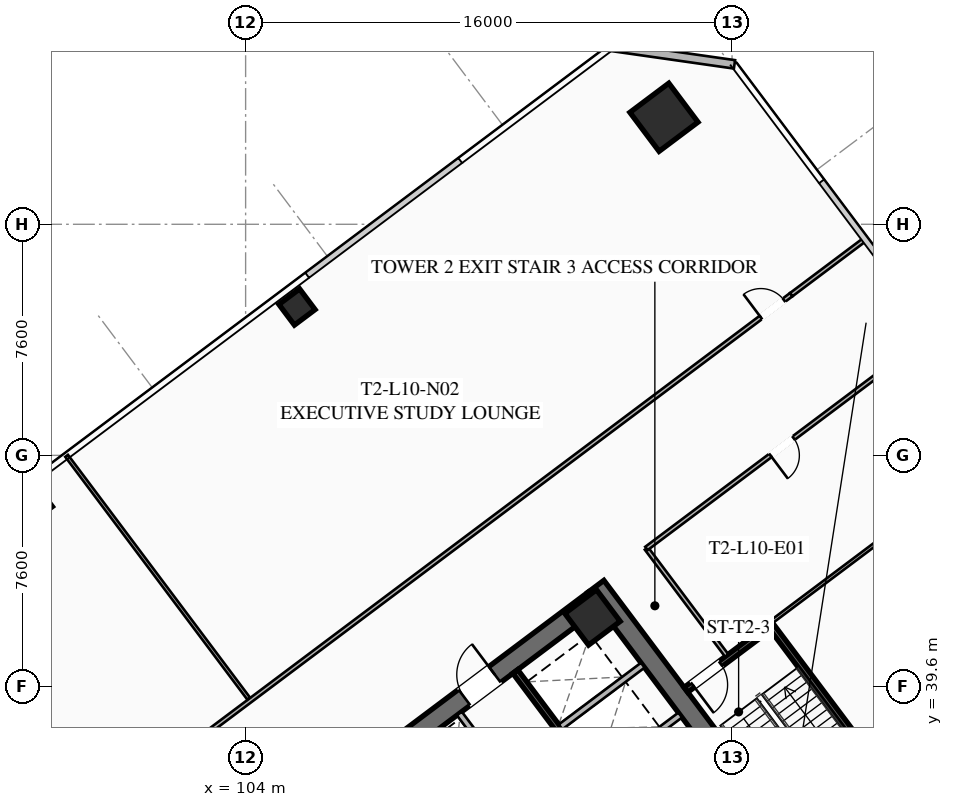
"""IFC4 building model, lengths in metres.
Left out: names, types, materials, properties, quantities, classifications, styles, units other than length and angle.
Written with IfcOpenShell. Run it as: python <this file> out.ifc"""

import sys

from ifc_helpers import new_model, si_unit, direction, frame, frame_2d, origin, origin_2d, place, context, subcontext, project, spatial, rectangle, hollow_rectangle, extrude, element, fill, save


model = new_model("IFC4")
c1 = context("Model", 3, precision=1e-05, world=origin(), true_north=direction((0.0, 1.0)))
c2 = subcontext(c1, "Body", "Model", "MODEL_VIEW")
j1 = project(units=[si_unit("LENGTHUNIT", "METRE"), si_unit("PLANEANGLEUNIT", "RADIAN")], contexts=[c1])
p1 = place(None, origin())
s1 = spatial("IfcSite", under=j1, at=p1, CompositionType="ELEMENT")
p2 = place(p1, origin())
s2 = spatial("IfcBuilding", under=s1, at=p2, CompositionType="ELEMENT")
p3 = place(p2, frame((0.0, 0.0, 42.35)))
s3 = spatial("IfcBuildingStorey", under=s2, at=p3, CompositionType="ELEMENT", Elevation=42.35)
p4 = place(p3, frame((115.524, 42.893, 0.0), z_axis=(0.0, 0.0, 1.0), x_axis=(0.600005007985, -0.799996243986, 0.0)))
e1 = element("IfcWall", 1, at=p4, inside=s3, PredefinedType="SHEAR", context=c2, shape_type="SweptSolid", body=[
    extrude(rectangle(XDim=15.6, YDim=0.65, at=frame_2d((7.8, 0.0))), origin(), (0.0, 0.0, 1.0), 3.55),
])
p5 = place(p3, frame((103.571, 33.522, 0.0), z_axis=(0.0, 0.0, 1.0), x_axis=(0.799998028465, 0.600002628705, 0.0)))
e2 = element("IfcWall", 2, at=p5, inside=s3, PredefinedType="SHEAR", context=c2, shape_type="SweptSolid", body=[
    extrude(rectangle(XDim=14.86, YDim=0.65, at=frame_2d((7.43, 0.0))), origin(), (0.0, 0.0, 1.0), 3.55),
])
p6 = place(p5, frame((4.48, 0.0, 0.0)))
e3 = element("IfcOpeningElement", 3, at=p6, cuts=e2, PredefinedType="OPENING", context=c2, shape_type="SweptSolid", body=[
    extrude(rectangle(XDim=1.25, YDim=2.25, at=frame_2d((0.625, 1.125))), frame((0.0, 0.335, 0.0), z_axis=(0.0, -1.0, 0.0), x_axis=(1.0, 0.0, 0.0)), (0.0, 0.0, 1.0), 0.67),
])
p7 = place(p5, frame((9.53, 0.0, 0.0)))
e4 = element("IfcOpeningElement", 4, at=p7, cuts=e2, PredefinedType="OPENING", context=c2, shape_type="SweptSolid", body=[
    extrude(rectangle(XDim=1.25, YDim=2.25, at=frame_2d((0.625, 1.125))), frame((0.0, 0.335, 0.0), z_axis=(0.0, -1.0, 0.0), x_axis=(1.0, 0.0, 0.0)), (0.0, 0.0, 1.0), 0.67),
])
p8 = place(p3, frame((115.41, 41.87, 0.0), z_axis=(0.0, 0.0, 1.0), x_axis=(0.799999996291, 0.600000004945, 0.0)))
e5 = element("IfcColumn", 5, at=p8, inside=s3, PredefinedType="COLUMN", context=c2, shape_type="SweptSolid", body=[
    extrude(hollow_rectangle(XDim=1.3, YDim=1.3, WallThickness=0.05, at=origin_2d()), origin(), (0.0, 0.0, 1.0), 3.35),
])
p9 = place(p3, frame((117.76, 58.32, 0.0), z_axis=(0.0, 0.0, 1.0), x_axis=(0.799999996291, 0.600000004945, 0.0)))
e6 = element("IfcColumn", 6, at=p9, inside=s3, PredefinedType="COLUMN", context=c2, shape_type="SweptSolid", body=[
    extrude(hollow_rectangle(XDim=1.6, YDim=1.6, WallThickness=0.06, at=origin_2d()), origin(), (0.0, 0.0, 1.0), 3.35),
])
for number, where, z_axis, x_axis in (
    (7, (105.69, 52.08, 0.0), (0.0, 0.0, 1.0), (0.8, 0.6, 0.0)),
    (8, (97.05, 45.6, 0.0), (0.0, 0.0, 1.0), (0.8, 0.6, 0.0)),
):
    element("IfcColumn", number, at=place(p3, frame(where, z_axis=z_axis, x_axis=x_axis)), inside=s3, PredefinedType="COLUMN", context=c2, shape_type="SweptSolid", body=[
        extrude(hollow_rectangle(XDim=0.85, YDim=0.85, WallThickness=0.035, at=origin_2d()), origin(), (0.0, 0.0, 1.0), 3.35),
    ])
p10 = place(p3, frame((116.02, 60.64, 0.0), z_axis=(0.0, 0.0, 1.0), x_axis=(0.989955445613, -0.14137968631, 0.0)))
e9 = element("IfcWall", 9, at=p10, inside=s3, PredefinedType="SOLIDWALL", context=c2, shape_type="SweptSolid", body=[
    extrude(rectangle(XDim=4.101, YDim=0.28, at=frame_2d((2.051, 0.0))), origin(), (0.0, 0.0, 1.0), 3.35),
])
p11 = place(p3, frame((112.87, 40.09, 0.0), z_axis=(0.0, 0.0, 1.0), x_axis=(0.599975393228, -0.800018454488, 0.0)))
e10 = element("IfcWall", 10, at=p11, inside=s3, PredefinedType="SHEAR", context=c2, shape_type="SweptSolid", body=[
    extrude(rectangle(XDim=6.35, YDim=0.2, at=frame_2d((3.175, 0.0))), origin(), (0.0, 0.0, 1.0), 3.35),
])
for number, where, z_axis, x_axis in (
    (11, (115.59, 36.63, 0.0), (0.0, 0.0, 1.0), (0.8, 0.6, 0.0)),
    (12, (114.36, 38.27, 0.0), (0.0, 0.0, 1.0), (0.8, 0.6, 0.0)),
):
    element("IfcWall", number, at=place(p3, frame(where, z_axis=z_axis, x_axis=x_axis)), inside=s3, PredefinedType="SOLIDWALL", context=c2, shape_type="SweptSolid", body=[
        extrude(rectangle(XDim=3.38, YDim=0.2, at=frame_2d((1.69, 0.0))), origin(), (0.0, 0.0, 1.0), 3.35),
    ])
p12 = place(p3, frame((115.11, 33.27, 0.0), z_axis=(0.0, 0.0, 1.0), x_axis=(-0.600011488909, 0.79999138319, 0.0)))
e13 = element("IfcWall", 13, at=p12, inside=s3, PredefinedType="SOLIDWALL", context=c2, shape_type="SweptSolid", body=[
    extrude(rectangle(XDim=6.8, YDim=0.2, at=frame_2d((3.4, 0.0))), origin(), (0.0, 0.0, 1.0), 3.35),
])
p13 = place(p3, frame((125.304, 36.228, 0.0), z_axis=(0.0, 0.0, 1.0), x_axis=(-0.59998851072, 0.800008616831, 0.0)))
e14 = element("IfcWall", 14, at=p13, inside=s3, PredefinedType="SHEAR", context=c2, shape_type="SweptSolid", body=[
    extrude(rectangle(XDim=6.8, YDim=0.2, at=frame_2d((3.4, 0.0))), origin(), (0.0, 0.0, 1.0), 3.35),
])
p14 = place(p3, frame((121.204, 41.528, 0.0), z_axis=(0.0, 0.0, 1.0), x_axis=(-0.800017232136, -0.599977023131, 0.0)))
e15 = element("IfcWall", 15, at=p14, inside=s3, PredefinedType="SHEAR", context=c2, shape_type="SweptSolid", body=[
    extrude(rectangle(XDim=3.4, YDim=0.2, at=frame_2d((1.7, 0.0))), origin(), (0.0, 0.0, 1.0), 3.35),
])
p15 = place(p14, frame((1.975, 0.0, 0.0)))
e16 = element("IfcOpeningElement", 16, at=p15, cuts=e15, PredefinedType="OPENING", context=c2, shape_type="SweptSolid", body=[
    extrude(rectangle(XDim=1.15, YDim=2.2, at=frame_2d((0.575, 1.1))), frame((0.0, 0.11, 0.0), z_axis=(0.0, -1.0, 0.0), x_axis=(1.0, 0.0, 0.0)), (0.0, 0.0, 1.0), 0.22),
])
p16 = place(p3, frame((119.824, 40.618, 0.0), z_axis=(0.0, 0.0, 1.0), x_axis=(-0.599982243973, 0.800013316712, 0.0)))
e17 = element("IfcWall", 17, at=p16, inside=s3, PredefinedType="PARTITIONING", context=c2, shape_type="SweptSolid", body=[
    extrude(rectangle(XDim=4.4, YDim=0.135, at=frame_2d((2.2, 0.0))), origin(), (0.0, 0.0, 1.0), 2.703),
])
p17 = place(p3, frame((98.084, 34.588, 0.0), z_axis=(0.0, 0.0, 1.0), x_axis=(0.799997053619, 0.600003928488, 0.0)))
e18 = element("IfcWall", 18, at=p17, inside=s3, PredefinedType="PARTITIONING", context=c2, shape_type="SweptSolid", body=[
    extrude(rectangle(XDim=29.83, YDim=0.135, at=frame_2d((14.915, 0.0))), origin(), (0.0, 0.0, 1.0), 2.703),
])
p18 = place(p17, frame((0.3, 0.0, 0.0)))
e19 = element("IfcOpeningElement", 19, at=p18, cuts=e18, PredefinedType="OPENING", context=c2, shape_type="SweptSolid", body=[
    extrude(rectangle(XDim=0.95, YDim=2.05, at=frame_2d((0.475, 1.025))), frame((0.0, 0.077, 0.0), z_axis=(0.0, -1.0, 0.0), x_axis=(1.0, 0.0, 0.0)), (0.0, 0.0, 1.0), 0.155),
])
p19 = place(p17, frame((28.58, 0.0, 0.0)))
e20 = element("IfcOpeningElement", 20, at=p19, cuts=e18, PredefinedType="OPENING", context=c2, shape_type="SweptSolid", body=[
    extrude(rectangle(XDim=0.95, YDim=2.05, at=frame_2d((0.475, 1.025))), frame((0.0, 0.077, 0.0), z_axis=(0.0, -1.0, 0.0), x_axis=(1.0, 0.0, 0.0)), (0.0, 0.0, 1.0), 0.155),
])
p20 = place(p3, frame((121.948, 52.486, 0.0), z_axis=(0.0, 0.0, 1.0), x_axis=(0.800029006059, 0.599961323307, 0.0)))
e21 = element("IfcWall", 21, at=p20, inside=s3, PredefinedType="PARTITIONING", context=c2, shape_type="SweptSolid", body=[
    extrude(rectangle(XDim=3.03, YDim=0.135, at=frame_2d((1.515, 0.0))), origin(), (0.0, 0.0, 1.0), 2.703),
])
p21 = place(p3, frame((104.1, 39.2, 0.0), z_axis=(0.0, 0.0, 1.0), x_axis=(-0.599996085964, 0.800002935512, 0.0)))
e22 = element("IfcWall", 22, at=p21, inside=s3, PredefinedType="PARTITIONING", context=c2, shape_type="SweptSolid", body=[
    extrude(rectangle(XDim=9.98, YDim=0.11, at=frame_2d((4.99, 0.0))), origin(), (0.0, 0.0, 1.0), 2.703),
])
p22 = place(p3, frame((126.544, 51.158, 0.0), z_axis=(0.0, 0.0, 1.0), x_axis=(-0.799994991918, -0.600006677385, 0.0)))
e23 = element("IfcWall", 23, at=p22, inside=s3, PredefinedType="PARTITIONING", context=c2, shape_type="SweptSolid", body=[
    extrude(rectangle(XDim=11.7, YDim=0.135, at=frame_2d((5.85, 0.0))), origin(), (0.0, 0.0, 1.0), 2.703),
])
p23 = place(p22, frame((5.65, 0.0, 0.0)))
e24 = element("IfcOpeningElement", 24, at=p23, cuts=e23, PredefinedType="OPENING", context=c2, shape_type="SweptSolid", body=[
    extrude(rectangle(XDim=0.95, YDim=2.05, at=frame_2d((0.475, 1.025))), frame((0.0, 0.077, 0.0), z_axis=(0.0, -1.0, 0.0), x_axis=(1.0, 0.0, 0.0)), (0.0, 0.0, 1.0), 0.155),
])
p24 = place(p3, frame((129.184, 47.638, 0.0), z_axis=(0.0, 0.0, 1.0), x_axis=(-0.800008922773, -0.599988102785, 0.0)))
e25 = element("IfcWall", 25, at=p24, inside=s3, PredefinedType="PARTITIONING", context=c2, shape_type="SweptSolid", body=[
    extrude(rectangle(XDim=9.85, YDim=0.11, at=frame_2d((4.925, 0.0))), origin(), (0.0, 0.0, 1.0), 2.703),
])
p25 = place(p7, origin())
e26 = element("IfcDoor", 26, at=p25, inside=s3, OperationType="SINGLE_SWING_RIGHT", PredefinedType="DOOR", context=c2, shape_type="SweptSolid", body=[
    extrude(rectangle(XDim=1.25, YDim=2.25, at=frame_2d((0.625, 1.125))), frame((0.0, 0.025, 0.0), z_axis=(0.0, -1.0, 0.0), x_axis=(1.0, 0.0, 0.0)), (0.0, 0.0, 1.0), 0.05),
])
fill(e4, e26)
p26 = place(p15, origin())
e27 = element("IfcDoor", 27, at=p26, inside=s3, OperationType="SINGLE_SWING_RIGHT", PredefinedType="DOOR", context=c2, shape_type="SweptSolid", body=[
    extrude(rectangle(XDim=1.15, YDim=2.2, at=frame_2d((0.575, 1.1))), frame((0.0, 0.025, 0.0), z_axis=(0.0, -1.0, 0.0), x_axis=(1.0, 0.0, 0.0)), (0.0, 0.0, 1.0), 0.05),
])
fill(e16, e27)
p27 = place(p19, origin())
e28 = element("IfcDoor", 28, at=p27, inside=s3, OperationType="SINGLE_SWING_LEFT", PredefinedType="DOOR", context=c2, shape_type="SweptSolid", body=[
    extrude(rectangle(XDim=0.95, YDim=2.05, at=frame_2d((0.475, 1.025))), frame((0.0, 0.025, 0.0), z_axis=(0.0, -1.0, 0.0), x_axis=(1.0, 0.0, 0.0)), (0.0, 0.0, 1.0), 0.05),
])
fill(e20, e28)
p28 = place(p23, origin())
e29 = element("IfcDoor", 29, at=p28, inside=s3, OperationType="SINGLE_SWING_RIGHT", PredefinedType="DOOR", context=c2, shape_type="SweptSolid", body=[
    extrude(rectangle(XDim=0.95, YDim=2.05, at=frame_2d((0.475, 1.025))), frame((0.0, 0.025, 0.0), z_axis=(0.0, -1.0, 0.0), x_axis=(1.0, 0.0, 0.0)), (0.0, 0.0, 1.0), 0.05),
])
fill(e24, e29)
save(model, sys.argv[1])
